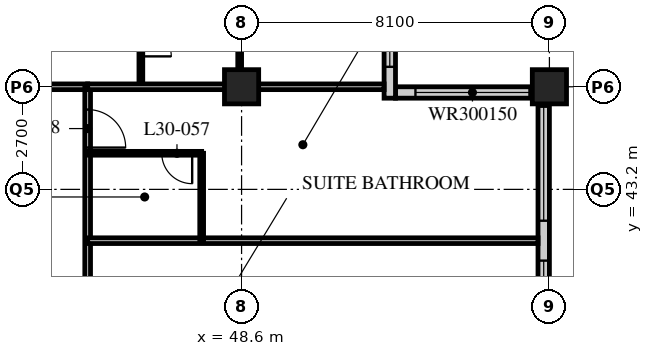
"""IFC4 building model, lengths in metres.
Left out: names, types, materials, properties, quantities, classifications, styles, units other than length and angle.
Written with IfcOpenShell. Run it as: python <this file> out.ifc"""

import sys

from ifc_helpers import new_model, si_unit, direction, frame, frame_2d, origin, origin_2d, place, context, subcontext, project, spatial, rectangle, hollow_rectangle, extrude, element, fill, save


model = new_model("IFC4")
c1 = context("Model", 3, precision=1e-05, world=origin(), true_north=direction((0.0, 1.0)))
c2 = subcontext(c1, "Body", "Model", "MODEL_VIEW")
j1 = project(units=[si_unit("LENGTHUNIT", "METRE"), si_unit("PLANEANGLEUNIT", "RADIAN")], contexts=[c1])
p1 = place(None, origin())
s1 = spatial("IfcSite", under=j1, at=p1, CompositionType="ELEMENT")
p2 = place(p1, origin())
s2 = spatial("IfcBuilding", under=s1, at=p2, CompositionType="ELEMENT")
p3 = place(p2, frame((0.0, 0.0, 120.4)))
s3 = spatial("IfcBuildingStorey", under=s2, at=p3, CompositionType="ELEMENT", Elevation=120.4)
for number, where, z_axis, x_axis in (
    (1, (48.6, 45.9, 0.0), (0.0, 0.0, 1.0), (1.0, 0.0, 0.0)),
    (2, (56.7, 45.9, 0.0), (0.0, 0.0, 1.0), (1.0, 0.0, 0.0)),
):
    element("IfcColumn", number, at=place(p3, frame(where, z_axis=z_axis, x_axis=x_axis)), inside=s3, PredefinedType="COLUMN", context=c2, shape_type="SweptSolid", body=[
        extrude(hollow_rectangle(XDim=0.9, YDim=0.9, WallThickness=0.09, at=origin_2d()), origin(), (0.0, 0.0, 1.0), 3.4),
    ])
p4 = place(p3, frame((56.55, 13.8, 0.0), z_axis=(0.0, 0.0, 1.0), x_axis=(0.0, 1.0, 0.0)))
e3 = element("IfcWall", 3, at=p4, inside=s3, PredefinedType="SOLIDWALL", context=c2, shape_type="SweptSolid", body=[
    extrude(rectangle(XDim=32.1, YDim=0.3, at=frame_2d((16.05, 0.0))), origin(), (0.0, 0.0, 1.0), 3.19),
])
p5 = place(p4, frame((0.225, 0.0, 0.9)))
e4 = element("IfcOpeningElement", 4, at=p5, cuts=e3, PredefinedType="OPENING", context=c2, shape_type="SweptSolid", body=[
    extrude(rectangle(XDim=3.0, YDim=2.0, at=frame_2d((1.5, 1.0))), frame((0.0, 0.16, 0.0), z_axis=(0.0, -1.0, 0.0), x_axis=(1.0, 0.0, 0.0)), (0.0, 0.0, 1.0), 0.32),
])
p6 = place(p4, frame((4.275, 0.0, 0.9)))
e5 = element("IfcOpeningElement", 5, at=p6, cuts=e3, PredefinedType="OPENING", context=c2, shape_type="SweptSolid", body=[
    extrude(rectangle(XDim=3.0, YDim=2.0, at=frame_2d((1.5, 1.0))), frame((0.0, 0.16, 0.0), z_axis=(0.0, -1.0, 0.0), x_axis=(1.0, 0.0, 0.0)), (0.0, 0.0, 1.0), 0.32),
])
p7 = place(p4, frame((8.325, 0.0, 0.9)))
e6 = element("IfcOpeningElement", 6, at=p7, cuts=e3, PredefinedType="OPENING", context=c2, shape_type="SweptSolid", body=[
    extrude(rectangle(XDim=3.0, YDim=2.0, at=frame_2d((1.5, 1.0))), frame((0.0, 0.16, 0.0), z_axis=(0.0, -1.0, 0.0), x_axis=(1.0, 0.0, 0.0)), (0.0, 0.0, 1.0), 0.32),
])
p8 = place(p4, frame((12.375, 0.0, 0.9)))
e7 = element("IfcOpeningElement", 7, at=p8, cuts=e3, PredefinedType="OPENING", context=c2, shape_type="SweptSolid", body=[
    extrude(rectangle(XDim=3.0, YDim=2.0, at=frame_2d((1.5, 1.0))), frame((0.0, 0.16, 0.0), z_axis=(0.0, -1.0, 0.0), x_axis=(1.0, 0.0, 0.0)), (0.0, 0.0, 1.0), 0.32),
])
p9 = place(p4, frame((16.425, 0.0, 0.9)))
e8 = element("IfcOpeningElement", 8, at=p9, cuts=e3, PredefinedType="OPENING", context=c2, shape_type="SweptSolid", body=[
    extrude(rectangle(XDim=3.0, YDim=2.0, at=frame_2d((1.5, 1.0))), frame((0.0, 0.16, 0.0), z_axis=(0.0, -1.0, 0.0), x_axis=(1.0, 0.0, 0.0)), (0.0, 0.0, 1.0), 0.32),
])
p10 = place(p4, frame((20.475, 0.0, 0.9)))
e9 = element("IfcOpeningElement", 9, at=p10, cuts=e3, PredefinedType="OPENING", context=c2, shape_type="SweptSolid", body=[
    extrude(rectangle(XDim=3.0, YDim=2.0, at=frame_2d((1.5, 1.0))), frame((0.0, 0.16, 0.0), z_axis=(0.0, -1.0, 0.0), x_axis=(1.0, 0.0, 0.0)), (0.0, 0.0, 1.0), 0.32),
])
p11 = place(p4, frame((24.525, 0.0, 0.9)))
e10 = element("IfcOpeningElement", 10, at=p11, cuts=e3, PredefinedType="OPENING", context=c2, shape_type="SweptSolid", body=[
    extrude(rectangle(XDim=3.0, YDim=2.0, at=frame_2d((1.5, 1.0))), frame((0.0, 0.16, 0.0), z_axis=(0.0, -1.0, 0.0), x_axis=(1.0, 0.0, 0.0)), (0.0, 0.0, 1.0), 0.32),
])
p12 = place(p4, frame((28.575, 0.0, 0.9)))
e11 = element("IfcOpeningElement", 11, at=p12, cuts=e3, PredefinedType="OPENING", context=c2, shape_type="SweptSolid", body=[
    extrude(rectangle(XDim=3.0, YDim=2.0, at=frame_2d((1.5, 1.0))), frame((0.0, 0.16, 0.0), z_axis=(0.0, -1.0, 0.0), x_axis=(1.0, 0.0, 0.0)), (0.0, 0.0, 1.0), 0.32),
])
p13 = place(p3, frame((56.4, 45.75, 0.0), z_axis=(0.0, 0.0, 1.0), x_axis=(-1.0, 0.0, 0.0)))
e12 = element("IfcWall", 12, at=p13, inside=s3, PredefinedType="SOLIDWALL", context=c2, shape_type="SweptSolid", body=[
    extrude(rectangle(XDim=3.75, YDim=0.3, at=frame_2d((1.875, 0.0))), origin(), (0.0, 0.0, 1.0), 3.19),
])
p14 = place(p13, frame((0.225, 0.0, 0.9)))
e13 = element("IfcOpeningElement", 13, at=p14, cuts=e12, PredefinedType="OPENING", context=c2, shape_type="SweptSolid", body=[
    extrude(rectangle(XDim=3.0, YDim=1.5, at=frame_2d((1.5, 0.75))), frame((0.0, 0.16, 0.0), z_axis=(0.0, -1.0, 0.0), x_axis=(1.0, 0.0, 0.0)), (0.0, 0.0, 1.0), 0.32),
])
p15 = place(p3, frame((52.5, 45.6, 0.0), z_axis=(0.0, 0.0, 1.0), x_axis=(0.0, 1.0, 0.0)))
e14 = element("IfcWall", 14, at=p15, inside=s3, PredefinedType="SOLIDWALL", context=c2, shape_type="SweptSolid", body=[
    extrude(rectangle(XDim=4.35, YDim=0.3, at=frame_2d((2.175, 0.0))), origin(), (0.0, 0.0, 1.0), 3.19),
])
p16 = place(p15, frame((0.825, 0.0, 0.9)))
e15 = element("IfcOpeningElement", 15, at=p16, cuts=e14, PredefinedType="OPENING", context=c2, shape_type="SweptSolid", body=[
    extrude(rectangle(XDim=3.0, YDim=1.5, at=frame_2d((1.5, 0.75))), frame((0.0, 0.16, 0.0), z_axis=(0.0, -1.0, 0.0), x_axis=(1.0, 0.0, 0.0)), (0.0, 0.0, 1.0), 0.32),
])
p17 = place(p3, frame((12.15, 45.9, 0.0), z_axis=(0.0, 0.0, 1.0), x_axis=(1.0, 0.0, 0.0)))
e16 = element("IfcWall", 16, at=p17, inside=s3, PredefinedType="PARTITIONING", context=c2, shape_type="SweptSolid", body=[
    extrude(rectangle(XDim=32.4, YDim=0.15, at=frame_2d((16.2, 0.0))), origin(), (0.0, 0.0, 1.0), 2.578),
])
p18 = place(p17, frame((5.95, 0.0, 0.0)))
e17 = element("IfcOpeningElement", 17, at=p18, cuts=e16, PredefinedType="OPENING", context=c2, shape_type="SweptSolid", body=[
    extrude(rectangle(XDim=1.0, YDim=2.1, at=frame_2d((0.5, 1.05))), frame((0.0, 0.085, 0.0), z_axis=(0.0, -1.0, 0.0), x_axis=(1.0, 0.0, 0.0)), (0.0, 0.0, 1.0), 0.17),
])
p19 = place(p17, frame((14.05, 0.0, 0.0)))
e18 = element("IfcOpeningElement", 18, at=p19, cuts=e16, PredefinedType="OPENING", context=c2, shape_type="SweptSolid", body=[
    extrude(rectangle(XDim=1.0, YDim=2.1, at=frame_2d((0.5, 1.05))), frame((0.0, 0.085, 0.0), z_axis=(0.0, -1.0, 0.0), x_axis=(1.0, 0.0, 0.0)), (0.0, 0.0, 1.0), 0.17),
])
p20 = place(p17, frame((25.7, 0.0, 0.0)))
e19 = element("IfcOpeningElement", 19, at=p20, cuts=e16, PredefinedType="OPENING", context=c2, shape_type="SweptSolid", body=[
    extrude(rectangle(XDim=1.0, YDim=2.1, at=frame_2d((0.5, 1.05))), frame((0.0, 0.085, 0.0), z_axis=(0.0, -1.0, 0.0), x_axis=(1.0, 0.0, 0.0)), (0.0, 0.0, 1.0), 0.17),
])
p21 = place(p17, frame((29.875, 0.0, 0.0)))
e20 = element("IfcOpeningElement", 20, at=p21, cuts=e16, PredefinedType="OPENING", context=c2, shape_type="SweptSolid", body=[
    extrude(rectangle(XDim=1.0, YDim=2.1, at=frame_2d((0.5, 1.05))), frame((0.0, 0.085, 0.0), z_axis=(0.0, -1.0, 0.0), x_axis=(1.0, 0.0, 0.0)), (0.0, 0.0, 1.0), 0.17),
])
p22 = place(p17, frame((1.525, 0.0, 0.0)))
e21 = element("IfcOpeningElement", 21, at=p22, cuts=e16, PredefinedType="OPENING", context=c2, shape_type="SweptSolid", body=[
    extrude(rectangle(XDim=1.0, YDim=2.1, at=frame_2d((0.5, 1.05))), frame((0.0, 0.085, 0.0), z_axis=(0.0, -1.0, 0.0), x_axis=(1.0, 0.0, 0.0)), (0.0, 0.0, 1.0), 0.17),
])
p23 = place(p3, frame((44.55, 17.55, 0.0), z_axis=(0.0, 0.0, 1.0), x_axis=(0.0, 1.0, 0.0)))
e22 = element("IfcWall", 22, at=p23, inside=s3, PredefinedType="PARTITIONING", context=c2, shape_type="SweptSolid", body=[
    extrude(rectangle(XDim=28.35, YDim=0.15, at=frame_2d((14.175, 0.0))), origin(), (0.0, 0.0, 1.0), 3.19),
])
p24 = place(p23, frame((2.75, 0.0, 0.0)))
e23 = element("IfcOpeningElement", 23, at=p24, cuts=e22, PredefinedType="OPENING", context=c2, shape_type="SweptSolid", body=[
    extrude(rectangle(XDim=1.0, YDim=2.1, at=frame_2d((0.5, 1.05))), frame((0.0, 0.085, 0.0), z_axis=(0.0, -1.0, 0.0), x_axis=(1.0, 0.0, 0.0)), (0.0, 0.0, 1.0), 0.17),
])
p25 = place(p23, frame((6.5, 0.0, 0.0)))
e24 = element("IfcOpeningElement", 24, at=p25, cuts=e22, PredefinedType="OPENING", context=c2, shape_type="SweptSolid", body=[
    extrude(rectangle(XDim=1.0, YDim=2.1, at=frame_2d((0.5, 1.05))), frame((0.0, 0.085, 0.0), z_axis=(0.0, -1.0, 0.0), x_axis=(1.0, 0.0, 0.0)), (0.0, 0.0, 1.0), 0.17),
])
p26 = place(p23, frame((10.0, 0.0, 0.0)))
e25 = element("IfcOpeningElement", 25, at=p26, cuts=e22, PredefinedType="OPENING", context=c2, shape_type="SweptSolid", body=[
    extrude(rectangle(XDim=1.0, YDim=2.1, at=frame_2d((0.5, 1.05))), frame((0.0, 0.085, 0.0), z_axis=(0.0, -1.0, 0.0), x_axis=(1.0, 0.0, 0.0)), (0.0, 0.0, 1.0), 0.17),
])
p27 = place(p23, frame((21.65, 0.0, 0.0)))
e26 = element("IfcOpeningElement", 26, at=p27, cuts=e22, PredefinedType="OPENING", context=c2, shape_type="SweptSolid", body=[
    extrude(rectangle(XDim=1.0, YDim=2.1, at=frame_2d((0.5, 1.05))), frame((0.0, 0.085, 0.0), z_axis=(0.0, -1.0, 0.0), x_axis=(1.0, 0.0, 0.0)), (0.0, 0.0, 1.0), 0.17),
])
p28 = place(p23, frame((26.75, 0.0, 0.0)))
e27 = element("IfcOpeningElement", 27, at=p28, cuts=e22, PredefinedType="OPENING", context=c2, shape_type="SweptSolid", body=[
    extrude(rectangle(XDim=1.0, YDim=2.1, at=frame_2d((0.5, 1.05))), frame((0.0, 0.085, 0.0), z_axis=(0.0, -1.0, 0.0), x_axis=(1.0, 0.0, 0.0)), (0.0, 0.0, 1.0), 0.17),
])
p29 = place(p3, frame((44.55, 41.85, 0.0), z_axis=(0.0, 0.0, 1.0), x_axis=(1.0, 0.0, 0.0)))
e28 = element("IfcWall", 28, at=p29, inside=s3, PredefinedType="PARTITIONING", context=c2, shape_type="SweptSolid", body=[
    extrude(rectangle(XDim=11.85, YDim=0.15, at=frame_2d((5.925, 0.0))), origin(), (0.0, 0.0, 1.0), 3.19),
])
p30 = place(p3, frame((47.55, 41.85, 0.0), z_axis=(0.0, 0.0, 1.0), x_axis=(0.0, 1.0, 0.0)))
e29 = element("IfcWall", 29, at=p30, inside=s3, PredefinedType="PARTITIONING", context=c2, shape_type="SweptSolid", body=[
    extrude(rectangle(XDim=2.3, YDim=0.1, at=frame_2d((1.15, 0.0))), origin(), (0.0, 0.0, 1.0), 3.19),
])
p31 = place(p3, frame((44.55, 44.15, 0.0), z_axis=(0.0, 0.0, 1.0), x_axis=(1.0, 0.0, 0.0)))
e30 = element("IfcWall", 30, at=p31, inside=s3, PredefinedType="PARTITIONING", context=c2, shape_type="SweptSolid", body=[
    extrude(rectangle(XDim=3.0, YDim=0.1, at=frame_2d((1.5, 0.0))), origin(), (0.0, 0.0, 1.0), 3.19),
])
p32 = place(p31, frame((1.95, 0.0, 0.0)))
e31 = element("IfcOpeningElement", 31, at=p32, cuts=e30, PredefinedType="OPENING", context=c2, shape_type="SweptSolid", body=[
    extrude(rectangle(XDim=0.8, YDim=2.1, at=frame_2d((0.4, 1.05))), frame((0.0, 0.06, 0.0), z_axis=(0.0, -1.0, 0.0), x_axis=(1.0, 0.0, 0.0)), (0.0, 0.0, 1.0), 0.12),
])
p33 = place(p3, frame((45.95, 45.9, 0.0), z_axis=(0.0, 0.0, 1.0), x_axis=(0.0, 1.0, 0.0)))
e32 = element("IfcWall", 32, at=p33, inside=s3, PredefinedType="PARTITIONING", context=c2, shape_type="SweptSolid", body=[
    extrude(rectangle(XDim=2.4, YDim=0.1, at=frame_2d((1.2, 0.0))), origin(), (0.0, 0.0, 1.0), 3.19),
])
p34 = place(p33, frame((0.8, 0.0, 0.0)))
e33 = element("IfcOpeningElement", 33, at=p34, cuts=e32, PredefinedType="OPENING", context=c2, shape_type="SweptSolid", body=[
    extrude(rectangle(XDim=0.8, YDim=2.1, at=frame_2d((0.4, 1.05))), frame((0.0, 0.06, 0.0), z_axis=(0.0, -1.0, 0.0), x_axis=(1.0, 0.0, 0.0)), (0.0, 0.0, 1.0), 0.12),
])
p35 = place(p3, frame((48.55, 45.9, 0.0), z_axis=(0.0, 0.0, 1.0), x_axis=(0.0, 1.0, 0.0)))
e34 = element("IfcWall", 34, at=p35, inside=s3, PredefinedType="PARTITIONING", context=c2, shape_type="SweptSolid", body=[
    extrude(rectangle(XDim=2.4, YDim=0.1, at=frame_2d((1.2, 0.0))), origin(), (0.0, 0.0, 1.0), 2.578),
])
p36 = place(p3, frame((44.55, 45.9, 0.0), z_axis=(0.0, 0.0, 1.0), x_axis=(1.0, 0.0, 0.0)))
e35 = element("IfcWall", 35, at=p36, inside=s3, PredefinedType="PARTITIONING", context=c2, shape_type="SweptSolid", body=[
    extrude(rectangle(XDim=7.8, YDim=0.15, at=frame_2d((3.9, 0.0))), origin(), (0.0, 0.0, 1.0), 2.578),
])
p37 = place(p11, origin())
e36 = element("IfcWindow", 36, at=p37, inside=s3, PartitioningType="SINGLE_PANEL", PredefinedType="WINDOW", context=c2, shape_type="SweptSolid", body=[
    extrude(rectangle(XDim=3.0, YDim=2.0, at=frame_2d((1.5, 1.0))), frame((0.0, 0.03, 0.0), z_axis=(0.0, -1.0, 0.0), x_axis=(1.0, 0.0, 0.0)), (0.0, 0.0, 1.0), 0.06),
])
fill(e10, e36)
p38 = place(p12, origin())
e37 = element("IfcWindow", 37, at=p38, inside=s3, PartitioningType="SINGLE_PANEL", PredefinedType="WINDOW", context=c2, shape_type="SweptSolid", body=[
    extrude(rectangle(XDim=3.0, YDim=2.0, at=frame_2d((1.5, 1.0))), frame((0.0, 0.03, 0.0), z_axis=(0.0, -1.0, 0.0), x_axis=(1.0, 0.0, 0.0)), (0.0, 0.0, 1.0), 0.06),
])
fill(e11, e37)
p39 = place(p14, origin())
e38 = element("IfcWindow", 38, at=p39, inside=s3, PartitioningType="SINGLE_PANEL", PredefinedType="WINDOW", context=c2, shape_type="SweptSolid", body=[
    extrude(rectangle(XDim=3.0, YDim=1.5, at=frame_2d((1.5, 0.75))), frame((0.0, 0.03, 0.0), z_axis=(0.0, -1.0, 0.0), x_axis=(1.0, 0.0, 0.0)), (0.0, 0.0, 1.0), 0.06),
])
fill(e13, e38)
p40 = place(p16, origin())
e39 = element("IfcWindow", 39, at=p40, inside=s3, PartitioningType="SINGLE_PANEL", PredefinedType="WINDOW", context=c2, shape_type="SweptSolid", body=[
    extrude(rectangle(XDim=3.0, YDim=1.5, at=frame_2d((1.5, 0.75))), frame((0.0, 0.03, 0.0), z_axis=(0.0, -1.0, 0.0), x_axis=(1.0, 0.0, 0.0)), (0.0, 0.0, 1.0), 0.06),
])
fill(e15, e39)
p41 = place(p32, origin())
e40 = element("IfcDoor", 40, at=p41, inside=s3, OperationType="SINGLE_SWING_LEFT", PredefinedType="DOOR", context=c2, shape_type="SweptSolid", body=[
    extrude(rectangle(XDim=0.8, YDim=2.1, at=frame_2d((0.4, 1.05))), frame((0.0, 0.025, 0.0), z_axis=(0.0, -1.0, 0.0), x_axis=(1.0, 0.0, 0.0)), (0.0, 0.0, 1.0), 0.05),
])
fill(e31, e40)
p42 = place(p28, origin())
e41 = element("IfcDoor", 41, at=p42, inside=s3, OperationType="SINGLE_SWING_RIGHT", PredefinedType="DOOR", context=c2, shape_type="SweptSolid", body=[
    extrude(rectangle(XDim=1.0, YDim=2.1, at=frame_2d((0.5, 1.05))), frame((0.0, 0.025, 0.0), z_axis=(0.0, -1.0, 0.0), x_axis=(1.0, 0.0, 0.0)), (0.0, 0.0, 1.0), 0.05),
])
fill(e27, e41)
p43 = place(p34, origin())
e42 = element("IfcDoor", 42, at=p43, inside=s3, OperationType="SINGLE_SWING_RIGHT", PredefinedType="DOOR", context=c2, shape_type="SweptSolid", body=[
    extrude(rectangle(XDim=0.8, YDim=2.1, at=frame_2d((0.4, 1.05))), frame((0.0, 0.025, 0.0), z_axis=(0.0, -1.0, 0.0), x_axis=(1.0, 0.0, 0.0)), (0.0, 0.0, 1.0), 0.05),
])
fill(e33, e42)
save(model, sys.argv[1])
